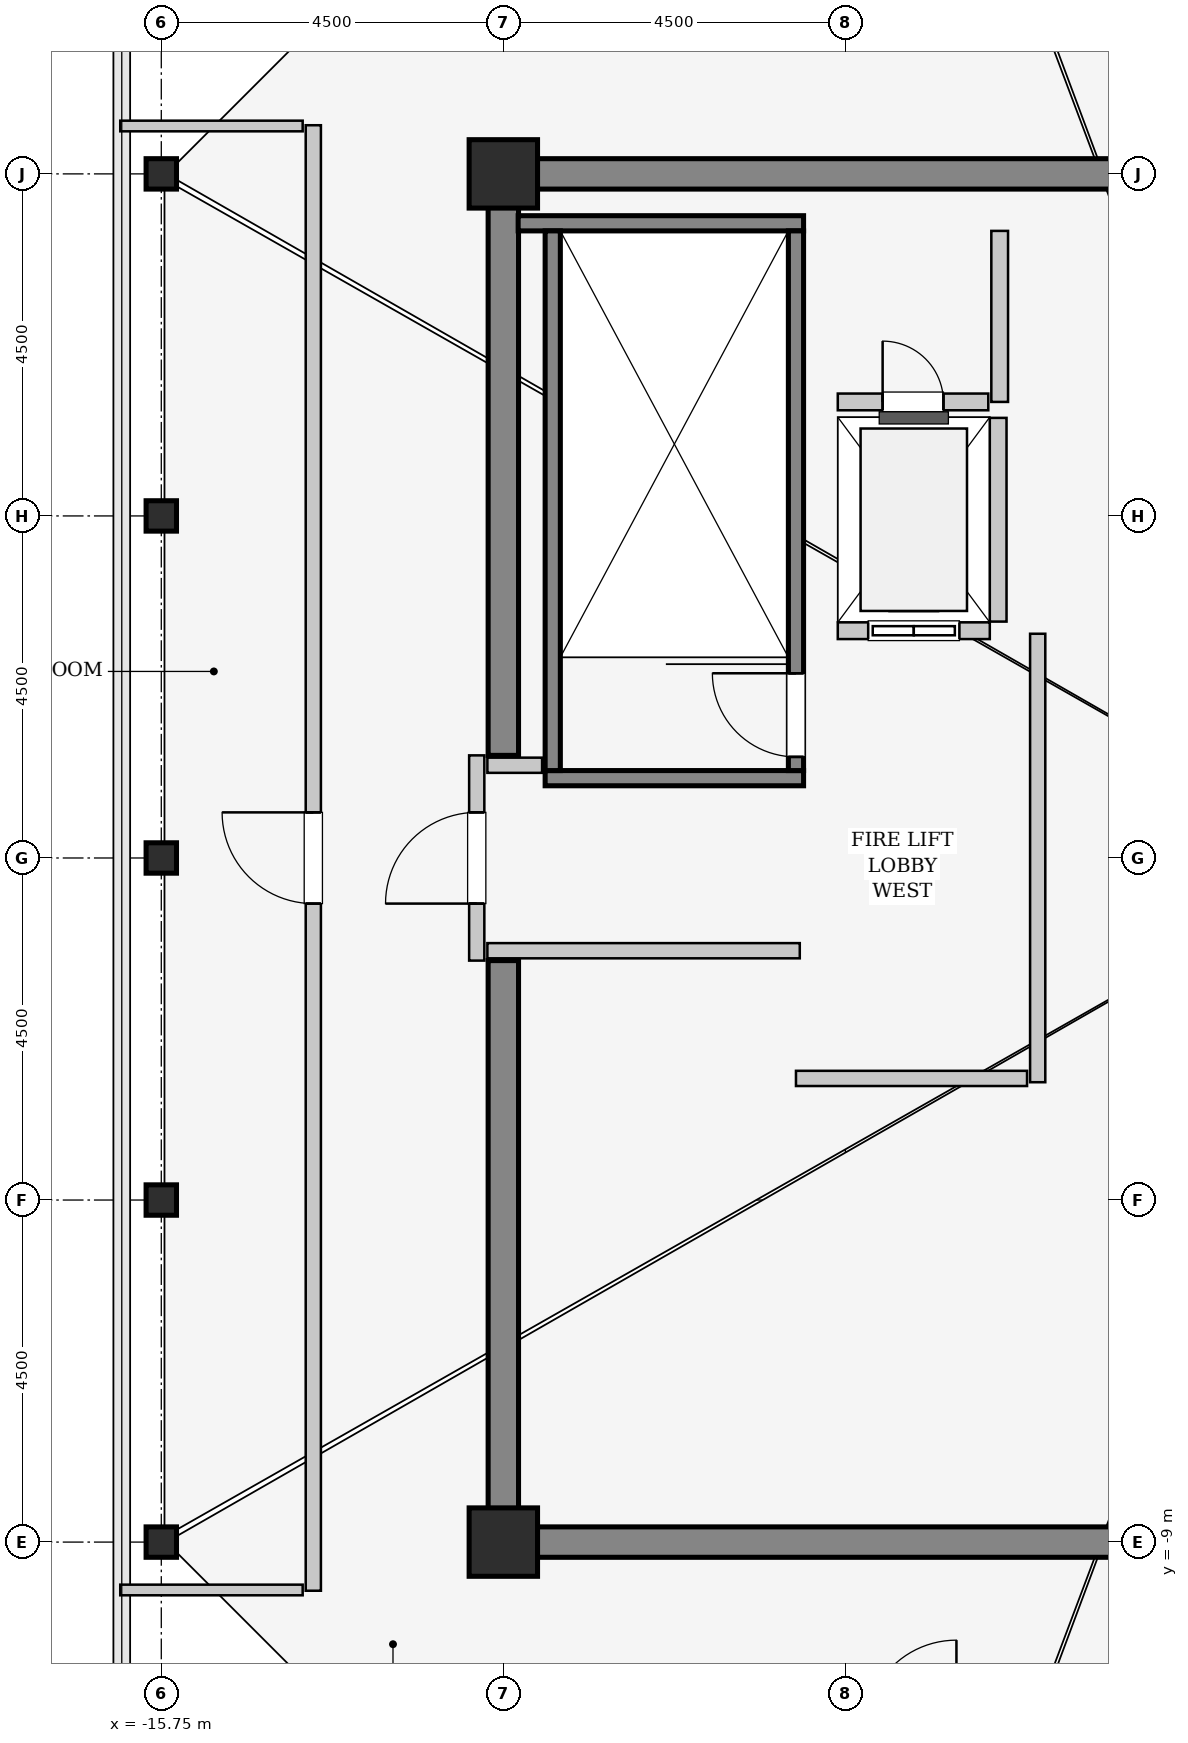
"""IFC4 building model, lengths in metres.
Left out: names, types, materials, properties, quantities, classifications, styles, units other than length and angle.
Written with IfcOpenShell. Run it as: python <this file> out.ifc"""

import sys

from ifc_helpers import new_model, si_unit, direction, frame, frame_2d, origin, origin_2d, place, context, subcontext, project, spatial, rectangle, hollow_rectangle, extrude, source, transform, mapped, element, fill, save


model = new_model("IFC4")
c1 = context("Model", 3, precision=1e-05, world=origin(), true_north=direction((0.0, 1.0)))
c2 = subcontext(c1, "Body", "Model", "MODEL_VIEW")
j1 = project(units=[si_unit("LENGTHUNIT", "METRE"), si_unit("PLANEANGLEUNIT", "RADIAN")], contexts=[c1])
p1 = place(None, origin())
s1 = spatial("IfcSite", under=j1, at=p1, CompositionType="ELEMENT")
p2 = place(p1, origin())
s2 = spatial("IfcBuilding", under=s1, at=p2, CompositionType="ELEMENT")
p3 = place(p2, frame((0.0, 0.0, 367.4)))
s3 = spatial("IfcBuildingStorey", under=s2, at=p3, CompositionType="ELEMENT", Elevation=367.4)
m1 = source(origin(), c2, "Body", "SweptSolid", [
    extrude(rectangle(XDim=9.9, YDim=0.4, at=frame_2d((4.95, 0.0))), origin(), (0.0, 0.0, 1.0), 4.4),
])
for number, where, z_axis, x_axis in (
    (1, (-11.45, 9.0, 0.0), (0.0, 0.0, 1.0), (1.0, 0.0, 0.0)),
    (2, (-11.45, -9.0, 0.0), (0.0, 0.0, 1.0), (1.0, 0.0, 0.0)),
):
    element("IfcWall", number, at=place(p3, frame(where, z_axis=z_axis, x_axis=x_axis)), inside=s3, PredefinedType="SHEAR", context=c2, shape_type="MappedRepresentation", body=[
        mapped(m1, transform((0.0, 0.0, 0.0), x_axis=(1.0, 0.0, 0.0), y_axis=(0.0, 1.0, 0.0), z_axis=(0.0, 0.0, 1.0), scale=1.0)),
    ])
m2 = source(origin(), c2, "Body", "SweptSolid", [
    extrude(rectangle(XDim=7.45, YDim=0.4, at=frame_2d((3.725, 0.0))), origin(), (0.0, 0.0, 1.0), 4.4),
])
for number, where, z_axis, x_axis in (
    (3, (-11.25, -8.8, 0.0), (0.0, 0.0, 1.0), (0.0, 1.0, 0.0)),
    (4, (-11.25, 1.35, 0.0), (0.0, 0.0, 1.0), (0.0, 1.0, 0.0)),
):
    element("IfcWall", number, at=place(p3, frame(where, z_axis=z_axis, x_axis=x_axis)), inside=s3, PredefinedType="SHEAR", context=c2, shape_type="MappedRepresentation", body=[
        mapped(m2, transform((0.0, 0.0, 0.0), x_axis=(1.0, 0.0, 0.0), y_axis=(0.0, 1.0, 0.0), z_axis=(0.0, 0.0, 1.0), scale=1.0)),
    ])
m3 = source(origin(), c2, "Body", "SweptSolid", [
    extrude(hollow_rectangle(XDim=0.4, YDim=0.4, WallThickness=0.02, InnerFilletRadius=0.02, OuterFilletRadius=0.04, at=origin_2d()), origin(), (0.0, 0.0, 1.0), 4.4),
])
for number, where, z_axis, x_axis in (
    (5, (-15.75, -9.0, 0.0), (0.0, 0.0, 1.0), (1.0, 0.0, 0.0)),
    (6, (-15.75, -4.5, 0.0), (0.0, 0.0, 1.0), (1.0, 0.0, 0.0)),
    (7, (-15.75, 0.0, 0.0), (0.0, 0.0, 1.0), (1.0, 0.0, 0.0)),
    (8, (-15.75, 4.5, 0.0), (0.0, 0.0, 1.0), (1.0, 0.0, 0.0)),
    (9, (-15.75, 9.0, 0.0), (0.0, 0.0, 1.0), (1.0, 0.0, 0.0)),
):
    element("IfcColumn", number, at=place(p3, frame(where, z_axis=z_axis, x_axis=x_axis)), inside=s3, PredefinedType="COLUMN", context=c2, shape_type="MappedRepresentation", body=[
        mapped(m3, transform((0.0, 0.0, 0.0), x_axis=(1.0, 0.0, 0.0), y_axis=(0.0, 1.0, 0.0), z_axis=(0.0, 0.0, 1.0), scale=1.0)),
    ])
m4 = source(origin(), c2, "Body", "SweptSolid", [
    extrude(rectangle(XDim=0.9, YDim=0.9, at=origin_2d()), origin(), (0.0, 0.0, 1.0), 4.4),
])
for number, where, z_axis, x_axis in (
    (10, (-11.25, -9.0, 0.0), (0.0, 0.0, 1.0), (1.0, 0.0, 0.0)),
    (11, (-11.25, 9.0, 0.0), (0.0, 0.0, 1.0), (1.0, 0.0, 0.0)),
):
    element("IfcColumn", number, at=place(p3, frame(where, z_axis=z_axis, x_axis=x_axis)), inside=s3, PredefinedType="COLUMN", context=c2, shape_type="MappedRepresentation", body=[
        mapped(m4, transform((0.0, 0.0, 0.0), x_axis=(1.0, 0.0, 0.0), y_axis=(0.0, 1.0, 0.0), z_axis=(0.0, 0.0, 1.0), scale=1.0)),
    ])
m5 = source(origin(), c2, "Body", "SweptSolid", [
    extrude(rectangle(XDim=3.4, YDim=0.2, at=frame_2d((1.7, 0.0))), origin(), (0.0, 0.0, 1.0), 4.1),
])
p4 = place(p3, frame((-7.3, 1.05, 0.0), z_axis=(0.0, 0.0, 1.0), x_axis=(-1.0, 0.0, 0.0)))
e12 = element("IfcWall", 12, at=p4, inside=s3, PredefinedType="SOLIDWALL", context=c2, shape_type="MappedRepresentation", body=[
    mapped(m5, transform((0.0, 0.0, 0.0), x_axis=(1.0, 0.0, 0.0), y_axis=(0.0, 1.0, 0.0), z_axis=(0.0, 0.0, 1.0), scale=1.0)),
])
m6 = source(origin(), c2, "Body", "SweptSolid", [
    extrude(rectangle(XDim=3.755, YDim=0.2, at=frame_2d((1.877, 0.0))), origin(), (0.0, 0.0, 1.0), 4.1),
])
p5 = place(p3, frame((-7.3, 8.35, 0.0), z_axis=(0.0, 0.0, 1.0), x_axis=(-1.0, 0.0, 0.0)))
e13 = element("IfcWall", 13, at=p5, inside=s3, PredefinedType="SOLIDWALL", context=c2, shape_type="MappedRepresentation", body=[
    mapped(m6, transform((0.0, 0.0, 0.0), x_axis=(1.0, 0.0, 0.0), y_axis=(0.0, 1.0, 0.0), z_axis=(0.0, 0.0, 1.0), scale=1.0)),
])
m7 = source(origin(), c2, "Body", "SweptSolid", [
    extrude(rectangle(XDim=7.1, YDim=0.2, at=frame_2d((3.55, 0.0))), origin(), (0.0, 0.0, 1.0), 4.1),
])
p6 = place(p3, frame((-7.4, 1.15, 0.0), z_axis=(0.0, 0.0, 1.0), x_axis=(0.0, 1.0, 0.0)))
e14 = element("IfcWall", 14, at=p6, inside=s3, PredefinedType="SOLIDWALL", context=c2, shape_type="MappedRepresentation", body=[
    mapped(m7, transform((0.0, 0.0, 0.0), x_axis=(1.0, 0.0, 0.0), y_axis=(0.0, 1.0, 0.0), z_axis=(0.0, 0.0, 1.0), scale=1.0)),
])
p7 = place(p6, frame((0.18, 0.0, 0.0)))
e15 = element("IfcOpeningElement", 15, at=p7, cuts=e14, PredefinedType="OPENING", context=c2, shape_type="SweptSolid", body=[
    extrude(rectangle(XDim=1.1, YDim=2.15, at=frame_2d((0.55, 1.075))), frame((0.0, 0.11, 0.0), z_axis=(0.0, -1.0, 0.0), x_axis=(1.0, 0.0, 0.0)), (0.0, 0.0, 1.0), 0.22),
])
p8 = place(p3, frame((-10.6, 1.15, 0.0), z_axis=(0.0, 0.0, 1.0), x_axis=(0.0, 1.0, 0.0)))
e16 = element("IfcWall", 16, at=p8, inside=s3, PredefinedType="SOLIDWALL", context=c2, shape_type="MappedRepresentation", body=[
    mapped(m7, transform((0.0, 0.0, 0.0), x_axis=(1.0, 0.0, 0.0), y_axis=(0.0, 1.0, 0.0), z_axis=(0.0, 0.0, 1.0), scale=1.0)),
])
m8 = source(origin(), c2, "Body", "SweptSolid", [
    extrude(rectangle(XDim=2.0, YDim=0.22, at=frame_2d((1.0, 0.0))), origin(), (0.0, 0.0, 1.0), 4.085),
])
p9 = place(p3, frame((-6.85, 2.99, 0.0), z_axis=(0.0, 0.0, 1.0), x_axis=(1.0, 0.0, 0.0)))
e17 = element("IfcWall", 17, at=p9, inside=s3, PredefinedType="SOLIDWALL", context=c2, shape_type="MappedRepresentation", body=[
    mapped(m8, transform((0.0, 0.0, 0.0), x_axis=(1.0, 0.0, 0.0), y_axis=(0.0, 1.0, 0.0), z_axis=(0.0, 0.0, 1.0), scale=1.0)),
])
p10 = place(p9, frame((0.4, 0.0, 0.0)))
e18 = element("IfcOpeningElement", 18, at=p10, cuts=e17, PredefinedType="OPENING", context=c2, shape_type="SweptSolid", body=[
    extrude(rectangle(XDim=1.2, YDim=2.2, at=frame_2d((0.6, 1.1))), frame((0.0, 0.12, 0.0), z_axis=(0.0, -1.0, 0.0), x_axis=(1.0, 0.0, 0.0)), (0.0, 0.0, 1.0), 0.24),
])
m9 = source(origin(), c2, "Body", "SweptSolid", [
    extrude(rectangle(XDim=2.68, YDim=0.22, at=frame_2d((1.34, 0.0))), origin(), (0.0, 0.0, 1.0), 4.085),
])
p11 = place(p3, frame((-4.74, 3.11, 0.0), z_axis=(0.0, 0.0, 1.0), x_axis=(0.0, 1.0, 0.0)))
e19 = element("IfcWall", 19, at=p11, inside=s3, PredefinedType="SOLIDWALL", context=c2, shape_type="MappedRepresentation", body=[
    mapped(m9, transform((0.0, 0.0, 0.0), x_axis=(1.0, 0.0, 0.0), y_axis=(0.0, 1.0, 0.0), z_axis=(0.0, 0.0, 1.0), scale=1.0)),
])
m10 = source(origin(), c2, "Body", "SweptSolid", [
    extrude(rectangle(XDim=2.25, YDim=0.22, at=frame_2d((1.125, 0.0))), origin(), (0.0, 0.0, 1.0), 4.085),
])
p12 = place(p3, frame((-4.72, 6.0, 0.0), z_axis=(0.0, 0.0, 1.0), x_axis=(0.0, 1.0, 0.0)))
e20 = element("IfcWall", 20, at=p12, inside=s3, PredefinedType="SOLIDWALL", context=c2, shape_type="MappedRepresentation", body=[
    mapped(m10, transform((0.0, 0.0, 0.0), x_axis=(1.0, 0.0, 0.0), y_axis=(0.0, 1.0, 0.0), z_axis=(0.0, 0.0, 1.0), scale=1.0)),
])
m11 = source(origin(), c2, "Body", "SweptSolid", [
    extrude(rectangle(XDim=1.98, YDim=0.22, at=frame_2d((0.99, 0.0))), origin(), (0.0, 0.0, 1.0), 4.085),
])
p13 = place(p3, frame((-6.85, 6.0, 0.0), z_axis=(0.0, 0.0, 1.0), x_axis=(1.0, 0.0, 0.0)))
e21 = element("IfcWall", 21, at=p13, inside=s3, PredefinedType="SOLIDWALL", context=c2, shape_type="MappedRepresentation", body=[
    mapped(m11, transform((0.0, 0.0, 0.0), x_axis=(1.0, 0.0, 0.0), y_axis=(0.0, 1.0, 0.0), z_axis=(0.0, 0.0, 1.0), scale=1.0)),
])
p14 = place(p13, frame((0.59, 0.0, 0.0)))
e22 = element("IfcOpeningElement", 22, at=p14, cuts=e21, PredefinedType="OPENING", context=c2, shape_type="SweptSolid", body=[
    extrude(rectangle(XDim=0.8, YDim=2.0, at=frame_2d((0.4, 1.0))), frame((0.0, 0.12, 0.0), z_axis=(0.0, -1.0, 0.0), x_axis=(1.0, 0.0, 0.0)), (0.0, 0.0, 1.0), 0.24),
])
m12 = source(origin(), c2, "Body", "SweptSolid", [
    extrude(rectangle(XDim=2.7, YDim=0.2, at=frame_2d((1.35, 0.0))), origin(), (0.0, 0.0, 1.0), 3.175),
])
p15 = place(p3, frame((-11.6, -1.35, 0.0), z_axis=(0.0, 0.0, 1.0), x_axis=(0.0, 1.0, 0.0)))
e23 = element("IfcWall", 23, at=p15, inside=s3, PredefinedType="PARTITIONING", context=c2, shape_type="MappedRepresentation", body=[
    mapped(m12, transform((0.0, 0.0, 0.0), x_axis=(1.0, 0.0, 0.0), y_axis=(0.0, 1.0, 0.0), z_axis=(0.0, 0.0, 1.0), scale=1.0)),
])
p16 = place(p15, frame((0.75, 0.0, 0.0)))
e24 = element("IfcOpeningElement", 24, at=p16, cuts=e23, PredefinedType="OPENING", context=c2, shape_type="SweptSolid", body=[
    extrude(rectangle(XDim=1.2, YDim=2.15, at=frame_2d((0.6, 1.075))), frame((0.0, 0.11, 0.0), z_axis=(0.0, -1.0, 0.0), x_axis=(1.0, 0.0, 0.0)), (0.0, 0.0, 1.0), 0.22),
])
m13 = source(origin(), c2, "Body", "SweptSolid", [
    extrude(rectangle(XDim=5.9, YDim=0.2, at=frame_2d((2.95, 0.0))), origin(), (0.0, 0.0, 1.0), 4.085),
])
p17 = place(p3, frame((-4.22, -2.95, 0.0), z_axis=(0.0, 0.0, 1.0), x_axis=(0.0, 1.0, 0.0)))
e25 = element("IfcWall", 25, at=p17, inside=s3, PredefinedType="PARTITIONING", context=c2, shape_type="MappedRepresentation", body=[
    mapped(m13, transform((0.0, 0.0, 0.0), x_axis=(1.0, 0.0, 0.0), y_axis=(0.0, 1.0, 0.0), z_axis=(0.0, 0.0, 1.0), scale=1.0)),
])
m14 = source(origin(), c2, "Body", "SweptSolid", [
    extrude(rectangle(XDim=3.04, YDim=0.2, at=frame_2d((1.52, 0.0))), origin(), (0.0, 0.0, 1.0), 4.085),
])
p18 = place(p3, frame((-7.4, -2.9, 0.0), z_axis=(0.0, 0.0, 1.0), x_axis=(1.0, 0.0, 0.0)))
e26 = element("IfcWall", 26, at=p18, inside=s3, PredefinedType="PARTITIONING", context=c2, shape_type="MappedRepresentation", body=[
    mapped(m14, transform((0.0, 0.0, 0.0), x_axis=(1.0, 0.0, 0.0), y_axis=(0.0, 1.0, 0.0), z_axis=(0.0, 0.0, 1.0), scale=1.0)),
])
m15 = source(origin(), c2, "Body", "SweptSolid", [
    extrude(rectangle(XDim=0.72, YDim=0.2, at=frame_2d((0.36, 0.0))), origin(), (0.0, 0.0, 1.0), 4.085),
])
p19 = place(p3, frame((-11.46, 1.22, 0.0), z_axis=(0.0, 0.0, 1.0), x_axis=(1.0, 0.0, 0.0)))
e27 = element("IfcWall", 27, at=p19, inside=s3, PredefinedType="PARTITIONING", context=c2, shape_type="MappedRepresentation", body=[
    mapped(m15, transform((0.0, 0.0, 0.0), x_axis=(1.0, 0.0, 0.0), y_axis=(0.0, 1.0, 0.0), z_axis=(0.0, 0.0, 1.0), scale=1.0)),
])
m16 = source(origin(), c2, "Body", "SweptSolid", [
    extrude(rectangle(XDim=4.11, YDim=0.2, at=frame_2d((2.055, 0.0))), origin(), (0.0, 0.0, 1.0), 4.085),
])
p20 = place(p3, frame((-11.46, -1.22, 0.0), z_axis=(0.0, 0.0, 1.0), x_axis=(1.0, 0.0, 0.0)))
e28 = element("IfcWall", 28, at=p20, inside=s3, PredefinedType="PARTITIONING", context=c2, shape_type="MappedRepresentation", body=[
    mapped(m16, transform((0.0, 0.0, 0.0), x_axis=(1.0, 0.0, 0.0), y_axis=(0.0, 1.0, 0.0), z_axis=(0.0, 0.0, 1.0), scale=1.0)),
])
m17 = source(origin(), c2, "Body", "SweptSolid", [
    extrude(rectangle(XDim=19.28, YDim=0.2, at=frame_2d((9.64, 0.0))), origin(), (0.0, 0.0, 1.0), 4.085),
])
p21 = place(p3, frame((-13.75, -9.64, 0.0), z_axis=(0.0, 0.0, 1.0), x_axis=(0.0, 1.0, 0.0)))
e29 = element("IfcWall", 29, at=p21, inside=s3, PredefinedType="SOLIDWALL", context=c2, shape_type="MappedRepresentation", body=[
    mapped(m17, transform((0.0, 0.0, 0.0), x_axis=(1.0, 0.0, 0.0), y_axis=(0.0, 1.0, 0.0), z_axis=(0.0, 0.0, 1.0), scale=1.0)),
])
p22 = place(p21, frame((9.04, 0.0, 0.0)))
e30 = element("IfcOpeningElement", 30, at=p22, cuts=e29, PredefinedType="OPENING", context=c2, shape_type="SweptSolid", body=[
    extrude(rectangle(XDim=1.2, YDim=2.15, at=frame_2d((0.6, 1.075))), frame((0.0, 0.11, 0.0), z_axis=(0.0, -1.0, 0.0), x_axis=(1.0, 0.0, 0.0)), (0.0, 0.0, 1.0), 0.22),
])
m18 = source(origin(), c2, "Body", "SweptSolid", [
    extrude(rectangle(XDim=2.4, YDim=0.14, at=frame_2d((1.2, 0.0))), origin(), (0.0, 0.0, 1.0), 4.085),
])
for number, where, z_axis, x_axis in (
    (31, (-16.29, -9.63, 0.0), (0.0, 0.0, 1.0), (1.0, 0.0, 0.0)),
    (32, (-16.29, 9.63, 0.0), (0.0, 0.0, 1.0), (1.0, 0.0, 0.0)),
):
    element("IfcWall", number, at=place(p3, frame(where, z_axis=z_axis, x_axis=x_axis)), inside=s3, PredefinedType="PARTITIONING", context=c2, shape_type="MappedRepresentation", body=[
        mapped(m18, transform((0.0, 0.0, 0.0), x_axis=(1.0, 0.0, 0.0), y_axis=(0.0, 1.0, 0.0), z_axis=(0.0, 0.0, 1.0), scale=1.0)),
    ])
m19 = source(origin(), c2, "Body", "SweptSolid", [
    extrude(rectangle(XDim=1.1, YDim=2.15, at=frame_2d((0.55, 1.075))), frame((0.0, 0.025, 0.0), z_axis=(0.0, -1.0, 0.0), x_axis=(1.0, 0.0, 0.0)), (0.0, 0.0, 1.0), 0.05),
])
p23 = place(p7, origin())
e33 = element("IfcDoor", 33, at=p23, inside=s3, OperationType="SINGLE_SWING_RIGHT", PredefinedType="DOOR", context=c2, shape_type="MappedRepresentation", body=[
    mapped(m19, transform((0.0, 0.0, 0.0), x_axis=(1.0, 0.0, 0.0), y_axis=(0.0, 1.0, 0.0), z_axis=(0.0, 0.0, 1.0), scale=1.0)),
])
fill(e15, e33)
m20 = source(origin(), c2, "Body", "SweptSolid", [
    extrude(rectangle(XDim=1.2, YDim=2.2, at=frame_2d((0.6, 1.1))), frame((0.0, 0.025, 0.0), z_axis=(0.0, -1.0, 0.0), x_axis=(1.0, 0.0, 0.0)), (0.0, 0.0, 1.0), 0.05),
])
p24 = place(p10, origin())
e34 = element("IfcDoor", 34, at=p24, inside=s3, OperationType="SLIDING_TO_LEFT", PredefinedType="DOOR", context=c2, shape_type="MappedRepresentation", body=[
    mapped(m20, transform((0.0, 0.0, 0.0), x_axis=(1.0, 0.0, 0.0), y_axis=(0.0, 1.0, 0.0), z_axis=(0.0, 0.0, 1.0), scale=1.0)),
])
fill(e18, e34)
m21 = source(origin(), c2, "Body", "SweptSolid", [
    extrude(rectangle(XDim=0.8, YDim=2.0, at=frame_2d((0.4, 1.0))), frame((0.0, 0.025, 0.0), z_axis=(0.0, -1.0, 0.0), x_axis=(1.0, 0.0, 0.0)), (0.0, 0.0, 1.0), 0.05),
])
p25 = place(p14, origin())
e35 = element("IfcDoor", 35, at=p25, inside=s3, OperationType="SINGLE_SWING_LEFT", PredefinedType="TRAPDOOR", context=c2, shape_type="MappedRepresentation", body=[
    mapped(m21, transform((0.0, 0.0, 0.0), x_axis=(1.0, 0.0, 0.0), y_axis=(0.0, 1.0, 0.0), z_axis=(0.0, 0.0, 1.0), scale=1.0)),
])
fill(e22, e35)
m22 = source(origin(), c2, "Body", "SweptSolid", [
    extrude(rectangle(XDim=1.2, YDim=2.15, at=frame_2d((0.6, 1.075))), frame((0.0, 0.025, 0.0), z_axis=(0.0, -1.0, 0.0), x_axis=(1.0, 0.0, 0.0)), (0.0, 0.0, 1.0), 0.05),
])
p26 = place(p16, origin())
e36 = element("IfcDoor", 36, at=p26, inside=s3, OperationType="SINGLE_SWING_LEFT", PredefinedType="DOOR", context=c2, shape_type="MappedRepresentation", body=[
    mapped(m22, transform((0.0, 0.0, 0.0), x_axis=(1.0, 0.0, 0.0), y_axis=(0.0, 1.0, 0.0), z_axis=(0.0, 0.0, 1.0), scale=1.0)),
])
fill(e24, e36)
p27 = place(p22, origin())
e37 = element("IfcDoor", 37, at=p27, inside=s3, OperationType="SINGLE_SWING_RIGHT", PredefinedType="DOOR", context=c2, shape_type="MappedRepresentation", body=[
    mapped(m22, transform((0.0, 0.0, 0.0), x_axis=(1.0, 0.0, 0.0), y_axis=(0.0, 1.0, 0.0), z_axis=(0.0, 0.0, 1.0), scale=1.0)),
])
fill(e30, e37)
save(model, sys.argv[1])
